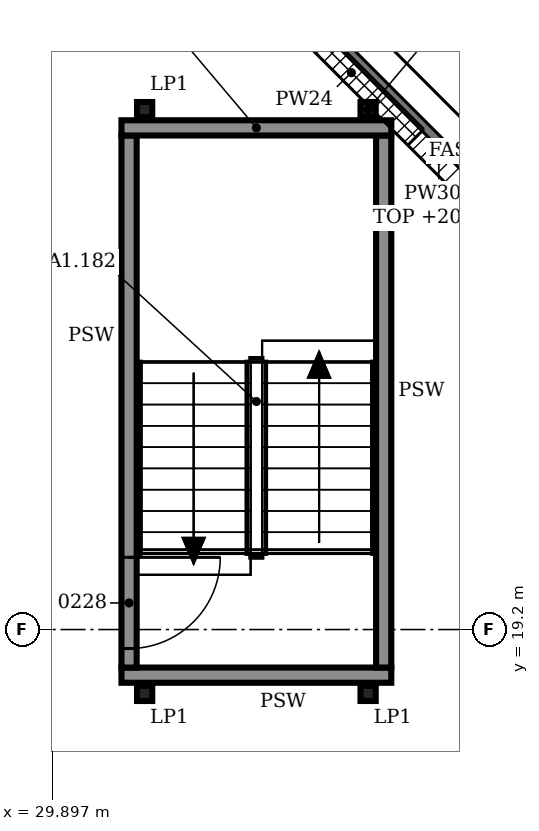
"""IFC4 building model, lengths in metres.
Left out: names, types, materials, properties, quantities, classifications, styles, units other than length and angle.
Written with IfcOpenShell. Run it as: python <this file> out.ifc"""

import sys

from ifc_helpers import new_model, si_unit, direction, frame, frame_2d, origin, origin_2d, place, context, subcontext, project, spatial, rectangle, i_section, extrude, element, fill, save


model = new_model("IFC4")
c1 = context("Model", 3, precision=1e-05, world=origin(), true_north=direction((0.0, 1.0)))
c2 = subcontext(c1, "Body", "Model", "MODEL_VIEW")
j1 = project(units=[si_unit("LENGTHUNIT", "METRE"), si_unit("PLANEANGLEUNIT", "RADIAN")], contexts=[c1])
p1 = place(None, origin())
s1 = spatial("IfcSite", under=j1, at=p1, CompositionType="ELEMENT")
p2 = place(p1, origin())
s2 = spatial("IfcBuilding", under=s1, at=p2, CompositionType="ELEMENT")
p3 = place(p2, frame((0.0, 0.0, 15.0)))
s3 = spatial("IfcBuildingStorey", under=s2, at=p3, CompositionType="ELEMENT", Elevation=15.0)
for number, where, z_axis, x_axis in (
    (1, (31.105, 26.04, 0.0), (0.0, 0.0, 1.0), (1.0, 0.0, 0.0)),
    (2, (34.045, 26.04, 0.0), (0.0, 0.0, 1.0), (1.0, 0.0, 0.0)),
):
    element("IfcColumn", number, at=place(p3, frame(where, z_axis=z_axis, x_axis=x_axis)), inside=s3, PredefinedType="COLUMN", context=c2, shape_type="SweptSolid", body=[
        extrude(i_section(OverallWidth=0.2, OverallDepth=0.2, WebThickness=0.009, FlangeThickness=0.015, FilletRadius=0.018, at=origin_2d()), origin(), (0.0, 0.0, 1.0), 6.0),
    ])
for number, where, z_axis, x_axis in (
    (3, (31.105, 18.36, 0.0), (0.0, 0.0, 1.0), (1.0, 0.0, 0.0)),
    (4, (34.045, 18.36, 0.0), (0.0, 0.0, 1.0), (1.0, 0.0, 0.0)),
):
    element("IfcColumn", number, at=place(p3, frame(where, z_axis=z_axis, x_axis=x_axis)), inside=s3, PredefinedType="COLUMN", context=c2, shape_type="SweptSolid", body=[
        extrude(i_section(OverallWidth=0.2, OverallDepth=0.2, WebThickness=0.009, FlangeThickness=0.015, FilletRadius=0.018, at=origin_2d()), origin(), (0.0, 0.0, 1.0), 2.8),
    ])
p4 = place(p3, frame((37.277, 23.075, 0.0), z_axis=(0.0, 0.0, 1.0), x_axis=(-0.707088024292, 0.707125537583, 0.0)))
e5 = element("IfcWall", 5, at=p4, inside=s3, PredefinedType="SOLIDWALL", context=c2, shape_type="SweptSolid", body=[
    extrude(rectangle(XDim=6.508, YDim=0.3, at=frame_2d((3.254, 0.0))), origin(), (0.0, 0.0, 1.0), 5.2),
])
p5 = place(p4, frame((0.427, 0.0, 0.9)))
e6 = element("IfcOpeningElement", 6, at=p5, cuts=e5, PredefinedType="OPENING", context=c2, shape_type="SweptSolid", body=[
    extrude(rectangle(XDim=2.4, YDim=2.4, at=frame_2d((1.2, 1.2))), frame((0.0, 0.16, 0.0), z_axis=(0.0, -1.0, 0.0), x_axis=(1.0, 0.0, 0.0)), (0.0, 0.0, 1.0), 0.32),
])
p6 = place(p4, frame((3.681, 0.0, 0.9)))
e7 = element("IfcOpeningElement", 7, at=p6, cuts=e5, PredefinedType="OPENING", context=c2, shape_type="SweptSolid", body=[
    extrude(rectangle(XDim=2.4, YDim=2.4, at=frame_2d((1.2, 1.2))), frame((0.0, 0.16, 0.0), z_axis=(0.0, -1.0, 0.0), x_axis=(1.0, 0.0, 0.0)), (0.0, 0.0, 1.0), 0.32),
])
p7 = place(p3, frame((30.8, 18.6, 0.0), z_axis=(0.0, 0.0, 1.0), x_axis=(1.0, 0.0, 0.0)))
e8 = element("IfcWall", 8, at=p7, inside=s3, PredefinedType="SOLIDWALL", context=c2, shape_type="SweptSolid", body=[
    extrude(rectangle(XDim=3.55, YDim=0.2, at=frame_2d((1.775, 0.0))), origin(), (0.0, 0.0, 1.0), 5.8),
])
p8 = place(p3, frame((30.9, 18.7, 0.0), z_axis=(0.0, 0.0, 1.0), x_axis=(0.0, 1.0, 0.0)))
e9 = element("IfcWall", 9, at=p8, inside=s3, PredefinedType="SOLIDWALL", context=c2, shape_type="SweptSolid", body=[
    extrude(rectangle(XDim=7.0, YDim=0.2, at=frame_2d((3.5, 0.0))), origin(), (0.0, 0.0, 1.0), 5.8),
])
p9 = place(p8, frame((0.25, 0.0, 0.0)))
e10 = element("IfcOpeningElement", 10, at=p9, cuts=e9, PredefinedType="OPENING", context=c2, shape_type="SweptSolid", body=[
    extrude(rectangle(XDim=1.2, YDim=2.1, at=frame_2d((0.6, 1.05))), frame((0.0, 0.11, 0.0), z_axis=(0.0, -1.0, 0.0), x_axis=(1.0, 0.0, 0.0)), (0.0, 0.0, 1.0), 0.22),
])
p10 = place(p3, frame((34.25, 18.7, 0.0), z_axis=(0.0, 0.0, 1.0), x_axis=(0.0, 1.0, 0.0)))
e11 = element("IfcWall", 11, at=p10, inside=s3, PredefinedType="SOLIDWALL", context=c2, shape_type="SweptSolid", body=[
    extrude(rectangle(XDim=7.0, YDim=0.2, at=frame_2d((3.5, 0.0))), origin(), (0.0, 0.0, 1.0), 5.8),
])
p11 = place(p3, frame((30.8, 25.8, 0.0), z_axis=(0.0, 0.0, 1.0), x_axis=(1.0, 0.0, 0.0)))
e12 = element("IfcWall", 12, at=p11, inside=s3, PredefinedType="SOLIDWALL", context=c2, shape_type="SweptSolid", body=[
    extrude(rectangle(XDim=3.55, YDim=0.2, at=frame_2d((1.775, 0.0))), origin(), (0.0, 0.0, 1.0), 5.8),
])
p12 = place(p6, origin())
e13 = element("IfcWindow", 13, at=p12, inside=s3, PartitioningType="SINGLE_PANEL", PredefinedType="WINDOW", context=c2, shape_type="SweptSolid", body=[
    extrude(rectangle(XDim=2.4, YDim=2.4, at=frame_2d((1.2, 1.2))), frame((0.0, 0.03, 0.0), z_axis=(0.0, -1.0, 0.0), x_axis=(1.0, 0.0, 0.0)), (0.0, 0.0, 1.0), 0.06),
])
fill(e7, e13)
p13 = place(p9, frame((1.2, 0.0, 0.0), z_axis=(0.0, 0.0, 1.0), x_axis=(-1.0, 0.0, 0.0)))
e14 = element("IfcDoor", 14, at=p13, inside=s3, OperationType="SINGLE_SWING_LEFT", PredefinedType="DOOR", context=c2, shape_type="SweptSolid", body=[
    extrude(rectangle(XDim=1.2, YDim=2.1, at=frame_2d((0.6, 1.05))), frame((0.0, 0.025, 0.0), z_axis=(0.0, -1.0, 0.0), x_axis=(1.0, 0.0, 0.0)), (0.0, 0.0, 1.0), 0.05),
])
fill(e10, e14)
save(model, sys.argv[1])
